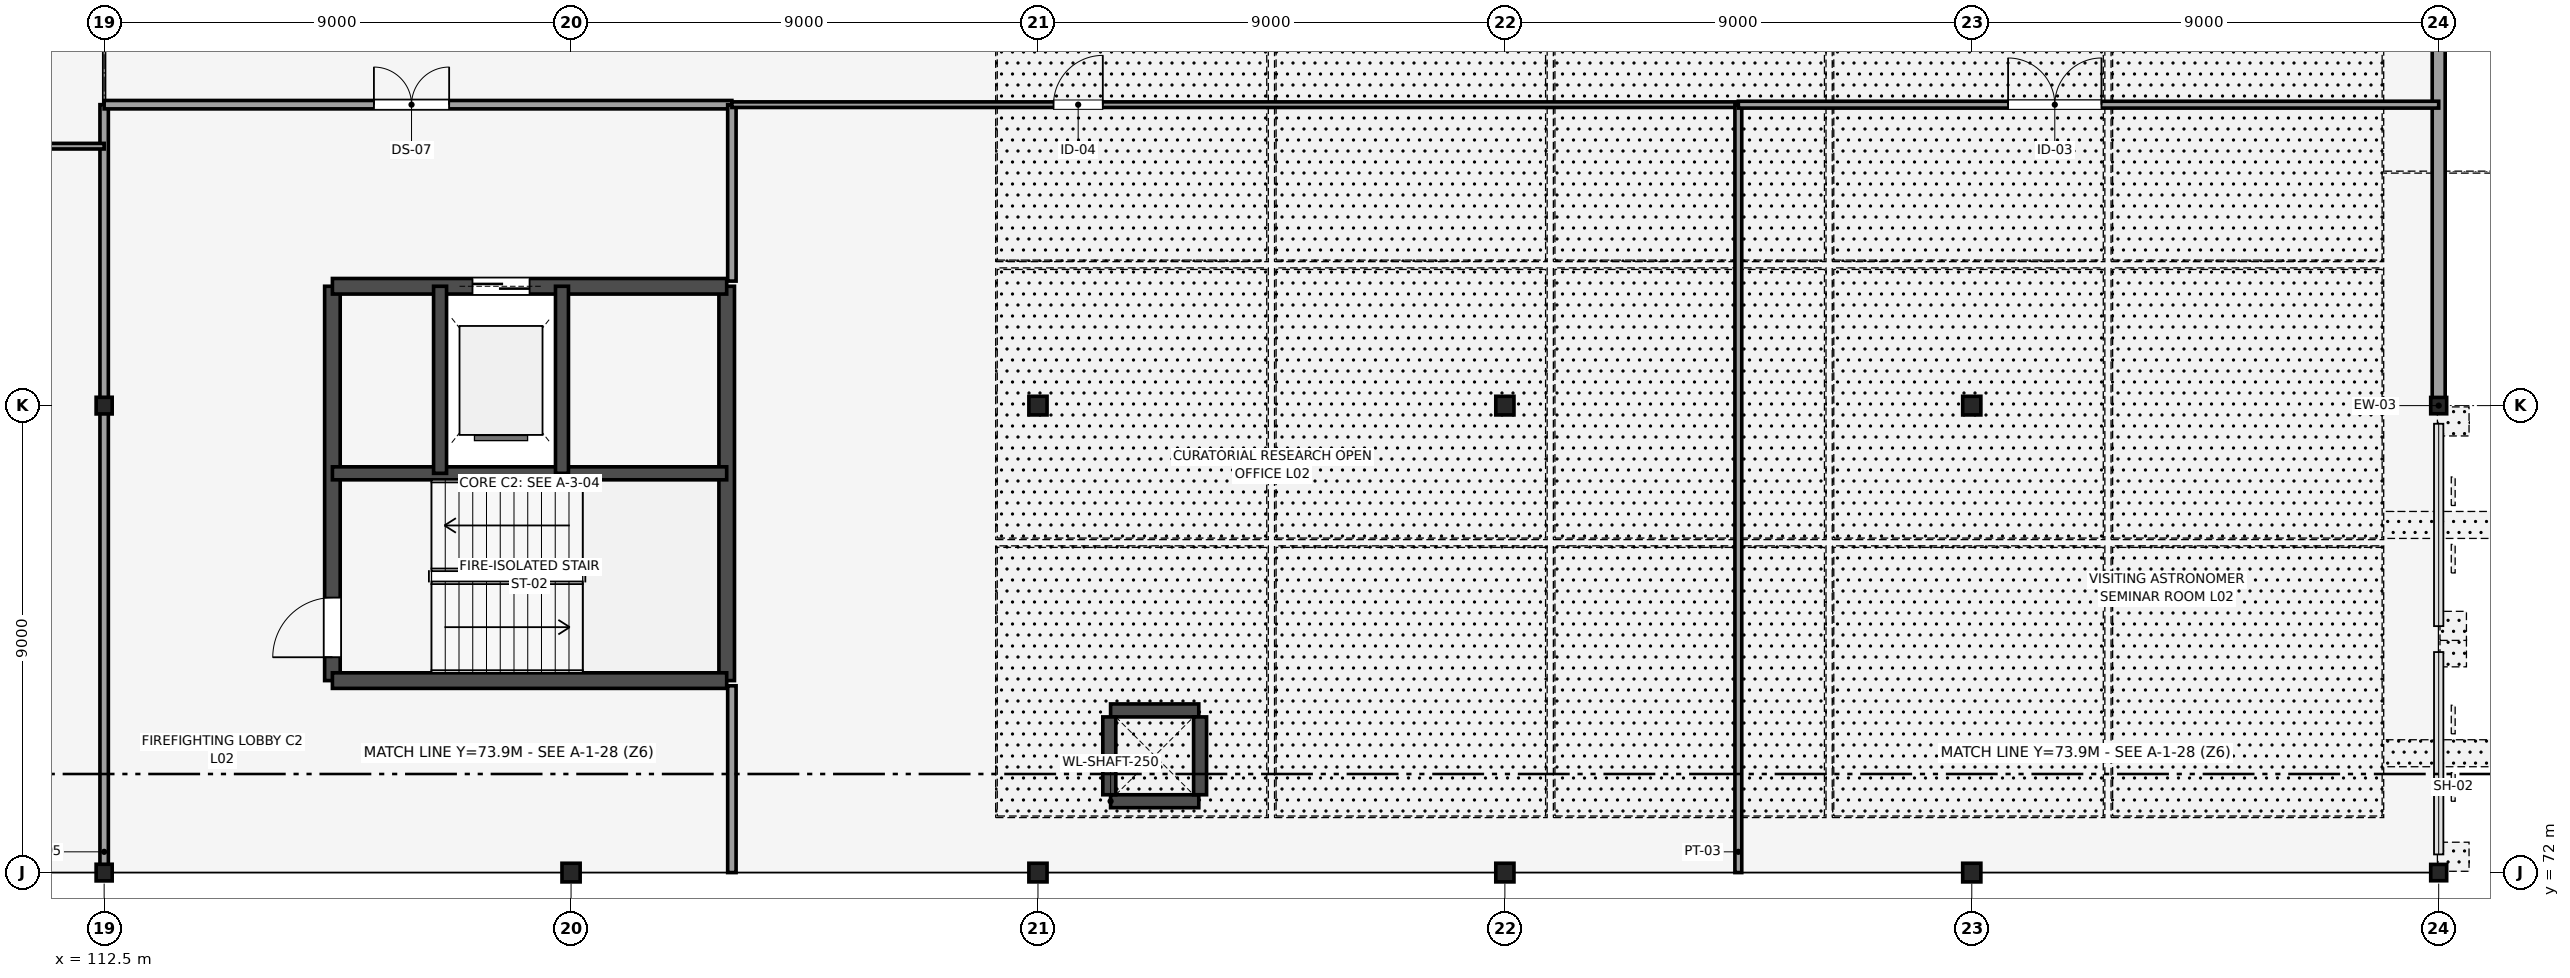
"""IFC4 building model, lengths in metres.
Left out: names, types, materials, properties, quantities, classifications, styles, units other than length and angle.
Written with IfcOpenShell. Run it as: python <this file> out.ifc"""

import sys

from ifc_helpers import new_model, si_unit, direction, frame, frame_2d, origin, origin_2d, place, context, subcontext, project, spatial, rectangle, i_section, extrude, element, fill, save


model = new_model("IFC4")
c1 = context("Model", 3, precision=1e-05, world=origin(), true_north=direction((0.0, 1.0)))
c2 = subcontext(c1, "Body", "Model", "MODEL_VIEW")
j1 = project(units=[si_unit("LENGTHUNIT", "METRE"), si_unit("PLANEANGLEUNIT", "RADIAN")], contexts=[c1])
p1 = place(None, origin())
s1 = spatial("IfcSite", under=j1, at=p1, CompositionType="ELEMENT")
p2 = place(p1, origin())
s2 = spatial("IfcBuilding", under=s1, at=p2, CompositionType="ELEMENT")
p3 = place(p2, frame((0.0, 0.0, 9.9)))
s3 = spatial("IfcBuildingStorey", under=s2, at=p3, CompositionType="ELEMENT", Elevation=9.9)
for number, where, z_axis, x_axis in (
    (1, (112.5, 72.0, 0.0), (0.0, 0.0, 1.0), (1.0, 0.0, 0.0)),
    (2, (112.5, 81.0, 0.0), (0.0, 0.0, 1.0), (1.0, 0.0, 0.0)),
):
    element("IfcColumn", number, at=place(p3, frame(where, z_axis=z_axis, x_axis=x_axis)), inside=s3, PredefinedType="COLUMN", context=c2, shape_type="SweptSolid", body=[
        extrude(i_section(OverallWidth=0.309, OverallDepth=0.321, WebThickness=0.014, FlangeThickness=0.022, FilletRadius=0.017, at=origin_2d()), origin(), (0.0, 0.0, 1.0), 4.5),
    ])
for number, where, z_axis, x_axis in (
    (3, (121.5, 72.0, 0.0), (0.0, 0.0, 1.0), (1.0, 0.0, 0.0)),
    (4, (130.5, 72.0, 0.0), (0.0, 0.0, 1.0), (1.0, 0.0, 0.0)),
    (5, (130.5, 81.0, 0.0), (0.0, 0.0, 1.0), (1.0, 0.0, 0.0)),
    (6, (139.5, 72.0, 0.0), (0.0, 0.0, 1.0), (1.0, 0.0, 0.0)),
    (7, (139.5, 81.0, 0.0), (0.0, 0.0, 1.0), (1.0, 0.0, 0.0)),
    (8, (148.5, 72.0, 0.0), (0.0, 0.0, 1.0), (1.0, 0.0, 0.0)),
    (9, (148.5, 81.0, 0.0), (0.0, 0.0, 1.0), (1.0, 0.0, 0.0)),
):
    element("IfcColumn", number, at=place(p3, frame(where, z_axis=z_axis, x_axis=x_axis)), inside=s3, PredefinedType="COLUMN", context=c2, shape_type="SweptSolid", body=[
        extrude(i_section(OverallWidth=0.35, OverallDepth=0.359, WebThickness=0.016, FlangeThickness=0.024, FilletRadius=0.014, at=origin_2d()), origin(), (0.0, 0.0, 1.0), 4.5),
    ])
for number, where, z_axis, x_axis in (
    (10, (157.5, 72.0, 0.0), (0.0, 0.0, 1.0), (1.0, 0.0, 0.0)),
    (11, (157.5, 81.0, 0.0), (0.0, 0.0, 1.0), (1.0, 0.0, 0.0)),
):
    element("IfcColumn", number, at=place(p3, frame(where, z_axis=z_axis, x_axis=x_axis)), inside=s3, PredefinedType="COLUMN", context=c2, shape_type="SweptSolid", body=[
        extrude(i_section(OverallWidth=0.307, OverallDepth=0.315, WebThickness=0.012, FlangeThickness=0.019, FilletRadius=0.017, at=origin_2d()), origin(), (0.0, 0.0, 1.0), 4.5),
    ])
p4 = place(p3, frame((116.9, 75.7, 0.0), z_axis=(0.0, 0.0, 1.0), x_axis=(0.0, 1.0, 0.0)))
e12 = element("IfcWall", 12, at=p4, inside=s3, PredefinedType="SHEAR", context=c2, shape_type="SweptSolid", body=[
    extrude(rectangle(XDim=7.6, YDim=0.3, at=frame_2d((3.8, 0.0))), origin(), (0.0, 0.0, 1.0), 4.5),
])
p5 = place(p4, frame((0.45, 0.0, 0.0)))
e13 = element("IfcOpeningElement", 13, at=p5, cuts=e12, PredefinedType="OPENING", context=c2, shape_type="SweptSolid", body=[
    extrude(rectangle(XDim=1.15, YDim=2.15, at=frame_2d((0.575, 1.075))), frame((0.0, 0.16, 0.0), z_axis=(0.0, -1.0, 0.0), x_axis=(1.0, 0.0, 0.0)), (0.0, 0.0, 1.0), 0.32),
])
for number, where, z_axis, x_axis in (
    (14, (124.5, 75.7, 0.0), (0.0, 0.0, 1.0), (0.0, 1.0, 0.0)),
    (15, (116.9, 75.7, 0.0), (0.0, 0.0, 1.0), (1.0, 0.0, 0.0)),
):
    element("IfcWall", number, at=place(p3, frame(where, z_axis=z_axis, x_axis=x_axis)), inside=s3, PredefinedType="SHEAR", context=c2, shape_type="SweptSolid", body=[
        extrude(rectangle(XDim=7.6, YDim=0.3, at=frame_2d((3.8, 0.0))), origin(), (0.0, 0.0, 1.0), 4.5),
    ])
p6 = place(p3, frame((116.9, 83.3, 0.0), z_axis=(0.0, 0.0, 1.0), x_axis=(1.0, 0.0, 0.0)))
e16 = element("IfcWall", 16, at=p6, inside=s3, PredefinedType="SHEAR", context=c2, shape_type="SweptSolid", body=[
    extrude(rectangle(XDim=7.6, YDim=0.3, at=frame_2d((3.8, 0.0))), origin(), (0.0, 0.0, 1.0), 4.5),
])
p7 = place(p6, frame((2.7, 0.0, 0.0)))
e17 = element("IfcOpeningElement", 17, at=p7, cuts=e16, PredefinedType="OPENING", context=c2, shape_type="SweptSolid", body=[
    extrude(rectangle(XDim=1.1, YDim=2.2, at=frame_2d((0.55, 1.1))), frame((0.0, 0.16, 0.0), z_axis=(0.0, -1.0, 0.0), x_axis=(1.0, 0.0, 0.0)), (0.0, 0.0, 1.0), 0.32),
])
p8 = place(p3, frame((116.9, 79.695, 0.0), z_axis=(0.0, 0.0, 1.0), x_axis=(1.0, 0.0, 0.0)))
e18 = element("IfcWall", 18, at=p8, inside=s3, PredefinedType="SHEAR", context=c2, shape_type="SweptSolid", body=[
    extrude(rectangle(XDim=7.6, YDim=0.25, at=frame_2d((3.8, 0.0))), origin(), (0.0, 0.0, 1.0), 4.5),
])
for number, where, z_axis, x_axis in (
    (19, (118.975, 79.695, 0.0), (0.0, 0.0, 1.0), (0.0, 1.0, 0.0)),
    (20, (121.325, 79.695, 0.0), (0.0, 0.0, 1.0), (0.0, 1.0, 0.0)),
):
    element("IfcWall", number, at=place(p3, frame(where, z_axis=z_axis, x_axis=x_axis)), inside=s3, PredefinedType="SHEAR", context=c2, shape_type="SweptSolid", body=[
        extrude(rectangle(XDim=3.605, YDim=0.25, at=frame_2d((1.802, 0.0))), origin(), (0.0, 0.0, 1.0), 4.5),
    ])
for number, where, z_axis, x_axis in (
    (21, (131.9, 73.375, 0.0), (0.0, 0.0, 1.0), (1.0, 0.0, 0.0)),
    (22, (131.9, 75.125, 0.0), (0.0, 0.0, 1.0), (1.0, 0.0, 0.0)),
):
    element("IfcWall", number, at=place(p3, frame(where, z_axis=z_axis, x_axis=x_axis)), inside=s3, PredefinedType="SHEAR", context=c2, shape_type="SweptSolid", body=[
        extrude(rectangle(XDim=1.7, YDim=0.25, at=frame_2d((0.85, 0.0))), origin(), (0.0, 0.0, 1.0), 3.77),
    ])
for number, where, z_axis, x_axis in (
    (23, (131.875, 73.5, 0.0), (0.0, 0.0, 1.0), (0.0, 1.0, 0.0)),
    (24, (133.625, 73.5, 0.0), (0.0, 0.0, 1.0), (0.0, 1.0, 0.0)),
):
    element("IfcWall", number, at=place(p3, frame(where, z_axis=z_axis, x_axis=x_axis)), inside=s3, PredefinedType="SHEAR", context=c2, shape_type="SweptSolid", body=[
        extrude(rectangle(XDim=1.5, YDim=0.25, at=frame_2d((0.75, 0.0))), origin(), (0.0, 0.0, 1.0), 3.77),
    ])
p9 = place(p3, frame((108.0, 72.0, 0.0), z_axis=(0.0, 0.0, 1.0), x_axis=(1.0, 0.0, 0.0)))
e25 = element("IfcWall", 25, at=p9, inside=s3, PredefinedType="STANDARD", context=c2, shape_type="SweptSolid", body=[
    extrude(rectangle(XDim=4.5, YDim=0.25, at=frame_2d((2.25, 0.0))), origin(), (0.0, 0.0, 1.0), 3.781),
])
p10 = place(p3, frame((157.5, 81.0, 0.0), z_axis=(0.0, 0.0, 1.0), x_axis=(0.0, 1.0, 0.0)))
e26 = element("IfcWall", 26, at=p10, inside=s3, PredefinedType="STANDARD", context=c2, shape_type="SweptSolid", body=[
    extrude(rectangle(XDim=9.0, YDim=0.25, at=frame_2d((4.5, 0.0))), origin(), (0.0, 0.0, 1.0), 3.846),
])
p11 = place(p3, frame((112.5, 72.0, 0.0), z_axis=(0.0, 0.0, 1.0), x_axis=(0.0, 1.0, 0.0)))
e27 = element("IfcWall", 27, at=p11, inside=s3, PredefinedType="PARTITIONING", context=c2, shape_type="SweptSolid", body=[
    extrude(rectangle(XDim=14.8, YDim=0.162, at=frame_2d((7.4, 0.0))), origin(), (0.0, 0.0, 1.0), 3.846),
])
p12 = place(p3, frame((112.5, 86.8, 0.0), z_axis=(0.0, 0.0, 1.0), x_axis=(1.0, 0.0, 0.0)))
e28 = element("IfcWall", 28, at=p12, inside=s3, PredefinedType="PARTITIONING", context=c2, shape_type="SweptSolid", body=[
    extrude(rectangle(XDim=12.1, YDim=0.162, at=frame_2d((6.05, 0.0))), origin(), (0.0, 0.0, 1.0), 4.32),
])
p13 = place(p12, frame((5.2, 0.0, 0.0)))
e29 = element("IfcOpeningElement", 29, at=p13, cuts=e28, PredefinedType="OPENING", context=c2, shape_type="SweptSolid", body=[
    extrude(rectangle(XDim=1.45, YDim=2.175, at=frame_2d((0.725, 1.087))), frame((0.0, 0.091, 0.0), z_axis=(0.0, -1.0, 0.0), x_axis=(1.0, 0.0, 0.0)), (0.0, 0.0, 1.0), 0.182),
])
p14 = place(p3, frame((124.6, 83.4, 0.0), z_axis=(0.0, 0.0, 1.0), x_axis=(0.0, 1.0, 0.0)))
e30 = element("IfcWall", 30, at=p14, inside=s3, PredefinedType="PARTITIONING", context=c2, shape_type="SweptSolid", body=[
    extrude(rectangle(XDim=3.4, YDim=0.162, at=frame_2d((1.7, 0.0))), origin(), (0.0, 0.0, 1.0), 4.32),
])
p15 = place(p3, frame((124.6, 72.0, 0.0), z_axis=(0.0, 0.0, 1.0), x_axis=(0.0, 1.0, 0.0)))
e31 = element("IfcWall", 31, at=p15, inside=s3, PredefinedType="PARTITIONING", context=c2, shape_type="SweptSolid", body=[
    extrude(rectangle(XDim=3.6, YDim=0.162, at=frame_2d((1.8, 0.0))), origin(), (0.0, 0.0, 1.0), 4.32),
])
p16 = place(p3, frame((88.0, 86.0, 0.0), z_axis=(0.0, 0.0, 1.0), x_axis=(1.0, 0.0, 0.0)))
e32 = element("IfcWall", 32, at=p16, inside=s3, PredefinedType="PARTITIONING", context=c2, shape_type="SweptSolid", body=[
    extrude(rectangle(XDim=24.5, YDim=0.108, at=frame_2d((12.25, 0.0))), origin(), (0.0, 0.0, 1.0), 4.32),
])
p17 = place(p16, frame((7.0, 0.0, 0.0)))
e33 = element("IfcOpeningElement", 33, at=p17, cuts=e32, PredefinedType="OPENING", context=c2, shape_type="SweptSolid", body=[
    extrude(rectangle(XDim=1.4, YDim=2.2, at=frame_2d((0.7, 1.1))), frame((0.0, 0.064, 0.0), z_axis=(0.0, -1.0, 0.0), x_axis=(1.0, 0.0, 0.0)), (0.0, 0.0, 1.0), 0.128),
])
p18 = place(p3, frame((124.6, 86.8, 0.0), z_axis=(0.0, 0.0, 1.0), x_axis=(1.0, 0.0, 0.0)))
e34 = element("IfcWall", 34, at=p18, inside=s3, PredefinedType="PARTITIONING", context=c2, shape_type="SweptSolid", body=[
    extrude(rectangle(XDim=19.4, YDim=0.108, at=frame_2d((9.7, 0.0))), origin(), (0.0, 0.0, 1.0), 4.32),
])
p19 = place(p18, frame((6.2, 0.0, 0.0)))
e35 = element("IfcOpeningElement", 35, at=p19, cuts=e34, PredefinedType="OPENING", context=c2, shape_type="SweptSolid", body=[
    extrude(rectangle(XDim=0.95, YDim=2.15, at=frame_2d((0.475, 1.075))), frame((0.0, 0.064, 0.0), z_axis=(0.0, -1.0, 0.0), x_axis=(1.0, 0.0, 0.0)), (0.0, 0.0, 1.0), 0.128),
])
p20 = place(p3, frame((144.0, 72.0, 0.0), z_axis=(0.0, 0.0, 1.0), x_axis=(0.0, 1.0, 0.0)))
e36 = element("IfcWall", 36, at=p20, inside=s3, PredefinedType="PARTITIONING", context=c2, shape_type="SweptSolid", body=[
    extrude(rectangle(XDim=14.8, YDim=0.132, at=frame_2d((7.4, 0.0))), origin(), (0.0, 0.0, 1.0), 4.32),
])
p21 = place(p3, frame((144.0, 86.8, 0.0), z_axis=(0.0, 0.0, 1.0), x_axis=(1.0, 0.0, 0.0)))
e37 = element("IfcWall", 37, at=p21, inside=s3, PredefinedType="PARTITIONING", context=c2, shape_type="SweptSolid", body=[
    extrude(rectangle(XDim=13.5, YDim=0.132, at=frame_2d((6.75, 0.0))), origin(), (0.0, 0.0, 1.0), 4.32),
])
p22 = place(p21, frame((5.2, 0.0, 0.0)))
e38 = element("IfcOpeningElement", 38, at=p22, cuts=e37, PredefinedType="OPENING", context=c2, shape_type="SweptSolid", body=[
    extrude(rectangle(XDim=1.8, YDim=2.3, at=frame_2d((0.9, 1.15))), frame((0.0, 0.076, 0.0), z_axis=(0.0, -1.0, 0.0), x_axis=(1.0, 0.0, 0.0)), (0.0, 0.0, 1.0), 0.152),
])
p23 = place(p5, origin())
e39 = element("IfcDoor", 39, at=p23, inside=s3, OperationType="SINGLE_SWING_LEFT", PredefinedType="DOOR", context=c2, shape_type="SweptSolid", body=[
    extrude(rectangle(XDim=1.15, YDim=2.15, at=frame_2d((0.575, 1.075))), frame((0.0, 0.025, 0.0), z_axis=(0.0, -1.0, 0.0), x_axis=(1.0, 0.0, 0.0)), (0.0, 0.0, 1.0), 0.05),
])
fill(e13, e39)
p24 = place(p7, origin())
e40 = element("IfcDoor", 40, at=p24, inside=s3, OperationType="DOUBLE_DOOR_SLIDING", PredefinedType="DOOR", context=c2, shape_type="SweptSolid", body=[
    extrude(rectangle(XDim=1.1, YDim=2.2, at=frame_2d((0.55, 1.1))), frame((0.0, 0.025, 0.0), z_axis=(0.0, -1.0, 0.0), x_axis=(1.0, 0.0, 0.0)), (0.0, 0.0, 1.0), 0.05),
])
fill(e17, e40)
p25 = place(p13, origin())
e41 = element("IfcDoor", 41, at=p25, inside=s3, OperationType="DOUBLE_DOOR_SINGLE_SWING", PredefinedType="DOOR", context=c2, shape_type="SweptSolid", body=[
    extrude(rectangle(XDim=1.45, YDim=2.175, at=frame_2d((0.725, 1.087))), frame((0.0, 0.025, 0.0), z_axis=(0.0, -1.0, 0.0), x_axis=(1.0, 0.0, 0.0)), (0.0, 0.0, 1.0), 0.05),
])
fill(e29, e41)
p26 = place(p19, origin())
e42 = element("IfcDoor", 42, at=p26, inside=s3, OperationType="SINGLE_SWING_RIGHT", PredefinedType="DOOR", context=c2, shape_type="SweptSolid", body=[
    extrude(rectangle(XDim=0.95, YDim=2.15, at=frame_2d((0.475, 1.075))), frame((0.0, 0.025, 0.0), z_axis=(0.0, -1.0, 0.0), x_axis=(1.0, 0.0, 0.0)), (0.0, 0.0, 1.0), 0.05),
])
fill(e35, e42)
p27 = place(p22, origin())
e43 = element("IfcDoor", 43, at=p27, inside=s3, OperationType="DOUBLE_DOOR_SINGLE_SWING", PredefinedType="DOOR", context=c2, shape_type="SweptSolid", body=[
    extrude(rectangle(XDim=1.8, YDim=2.3, at=frame_2d((0.9, 1.15))), frame((0.0, 0.025, 0.0), z_axis=(0.0, -1.0, 0.0), x_axis=(1.0, 0.0, 0.0)), (0.0, 0.0, 1.0), 0.05),
])
fill(e38, e43)
save(model, sys.argv[1])
